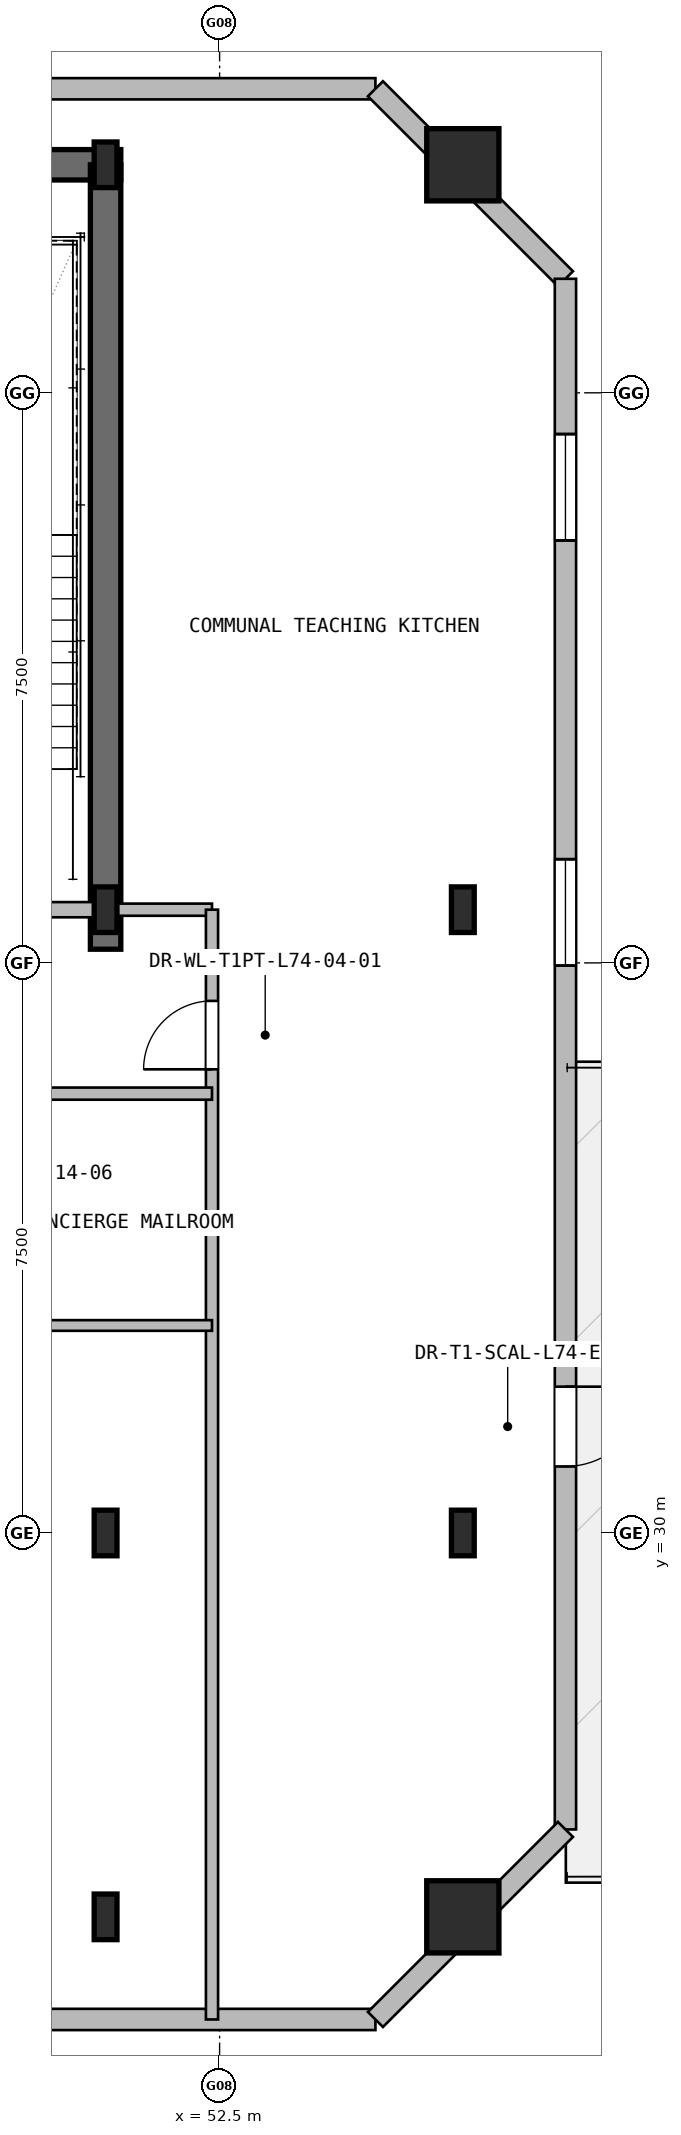
"""IFC4 building model, lengths in metres.
Left out: names, types, materials, properties, quantities, classifications, styles, units other than length and angle.
Written with IfcOpenShell. Run it as: python <this file> out.ifc"""

import sys

from ifc_helpers import new_model, si_unit, direction, frame, frame_2d, origin, origin_2d, place, context, subcontext, project, spatial, rectangle, hollow_rectangle, i_section, extrude, element, fill, save


model = new_model("IFC4")
c1 = context("Model", 3, precision=1e-05, world=origin(), true_north=direction((0.0, 1.0)))
c2 = subcontext(c1, "Body", "Model", "MODEL_VIEW")
j1 = project(units=[si_unit("LENGTHUNIT", "METRE"), si_unit("PLANEANGLEUNIT", "RADIAN")], contexts=[c1])
p1 = place(None, origin())
s1 = spatial("IfcSite", under=j1, at=p1, CompositionType="ELEMENT")
p2 = place(p1, origin())
s2 = spatial("IfcBuilding", under=s1, at=p2, CompositionType="ELEMENT")
p3 = place(p2, frame((0.0, 0.0, 265.8)))
s3 = spatial("IfcBuildingStorey", under=s2, at=p3, CompositionType="ELEMENT", Elevation=265.8)
p4 = place(p3, frame((23.8, 48.0, 0.0), z_axis=(0.0, 0.0, 1.0), x_axis=(1.0, 0.0, 0.0)))
e1 = element("IfcWall", 1, at=p4, inside=s3, PredefinedType="SHEAR", context=c2, shape_type="SweptSolid", body=[
    extrude(rectangle(XDim=27.4, YDim=0.4, at=frame_2d((13.7, 0.0))), origin(), (0.0, 0.0, 1.0), 4.2),
])
p5 = place(p3, frame((51.0, 37.68, 0.0), z_axis=(0.0, 0.0, 1.0), x_axis=(0.0, 1.0, 0.0)))
e2 = element("IfcWall", 2, at=p5, inside=s3, PredefinedType="SHEAR", context=c2, shape_type="SweptSolid", body=[
    extrude(rectangle(XDim=10.32, YDim=0.4, at=frame_2d((5.16, 0.0))), origin(), (0.0, 0.0, 1.0), 4.2),
])
for number, where, z_axis, x_axis in (
    (3, (51.0, 24.95, 0.0), (0.0, 0.0, 1.0), (1.0, 0.0, 0.0)),
    (4, (51.0, 30.0, 0.0), (0.0, 0.0, 1.0), (1.0, 0.0, 0.0)),
    (5, (51.0, 38.2, 0.0), (0.0, 0.0, 1.0), (1.0, 0.0, 0.0)),
    (6, (51.0, 48.0, 0.0), (0.0, 0.0, 1.0), (1.0, 0.0, 0.0)),
):
    element("IfcColumn", number, at=place(p3, frame(where, z_axis=z_axis, x_axis=x_axis)), inside=s3, PredefinedType="COLUMN", context=c2, shape_type="SweptSolid", body=[
        extrude(i_section(OverallWidth=0.3, OverallDepth=0.6, WebThickness=0.014, FlangeThickness=0.025, at=origin_2d()), origin(), (0.0, 0.0, 1.0), 4.2),
    ])
p6 = place(p3, frame((55.7, 24.95, 0.0), z_axis=(0.0, 0.0, 1.0), x_axis=(1.0, 0.0, 0.0)))
e7 = element("IfcColumn", 7, at=p6, inside=s3, PredefinedType="COLUMN", context=c2, shape_type="SweptSolid", body=[
    extrude(hollow_rectangle(XDim=0.95, YDim=0.95, WallThickness=0.028, at=origin_2d()), origin(), (0.0, 0.0, 1.0), 4.2),
])
for number, where, z_axis, x_axis in (
    (8, (55.7, 30.0, 0.0), (0.0, 0.0, 1.0), (1.0, 0.0, 0.0)),
    (9, (55.7, 38.2, 0.0), (0.0, 0.0, 1.0), (1.0, 0.0, 0.0)),
):
    element("IfcColumn", number, at=place(p3, frame(where, z_axis=z_axis, x_axis=x_axis)), inside=s3, PredefinedType="COLUMN", context=c2, shape_type="SweptSolid", body=[
        extrude(i_section(OverallWidth=0.3, OverallDepth=0.6, WebThickness=0.014, FlangeThickness=0.025, at=origin_2d()), origin(), (0.0, 0.0, 1.0), 4.2),
    ])
p7 = place(p3, frame((55.7, 48.0, 0.0), z_axis=(0.0, 0.0, 1.0), x_axis=(1.0, 0.0, 0.0)))
e10 = element("IfcColumn", 10, at=p7, inside=s3, PredefinedType="COLUMN", context=c2, shape_type="SweptSolid", body=[
    extrude(hollow_rectangle(XDim=0.95, YDim=0.95, WallThickness=0.028, at=origin_2d()), origin(), (0.0, 0.0, 1.0), 4.2),
])
p8 = place(p3, frame((54.55, 23.6, 0.0), z_axis=(0.0, 0.0, 1.0), x_axis=(-1.0, 0.0, 0.0)))
e11 = element("IfcWall", 11, at=p8, inside=s3, PredefinedType="SOLIDWALL", context=c2, shape_type="SweptSolid", body=[
    extrude(rectangle(XDim=34.1, YDim=0.28, at=frame_2d((17.05, 0.0))), origin(), (0.0, 0.0, 1.0), 3.93),
])
p9 = place(p8, frame((17.728, 0.0, 0.8)))
e12 = element("IfcOpeningElement", 12, at=p9, cuts=e11, PredefinedType="OPENING", context=c2, shape_type="SweptSolid", body=[
    extrude(rectangle(XDim=1.1, YDim=1.5, at=frame_2d((0.55, 0.75))), frame((0.0, 0.15, 0.0), z_axis=(0.0, -1.0, 0.0), x_axis=(1.0, 0.0, 0.0)), (0.0, 0.0, 1.0), 0.3),
])
p10 = place(p8, frame((15.279, 0.0, 0.8)))
e13 = element("IfcOpeningElement", 13, at=p10, cuts=e11, PredefinedType="OPENING", context=c2, shape_type="SweptSolid", body=[
    extrude(rectangle(XDim=1.1, YDim=1.5, at=frame_2d((0.55, 0.75))), frame((0.0, 0.15, 0.0), z_axis=(0.0, -1.0, 0.0), x_axis=(1.0, 0.0, 0.0)), (0.0, 0.0, 1.0), 0.3),
])
p11 = place(p3, frame((20.45, 49.0, 0.0), z_axis=(0.0, 0.0, 1.0), x_axis=(1.0, 0.0, 0.0)))
e14 = element("IfcWall", 14, at=p11, inside=s3, PredefinedType="SOLIDWALL", context=c2, shape_type="SweptSolid", body=[
    extrude(rectangle(XDim=34.1, YDim=0.28, at=frame_2d((17.05, 0.0))), origin(), (0.0, 0.0, 1.0), 3.93),
])
p12 = place(p3, frame((54.55, 49.0, 0.0), z_axis=(0.0, 0.0, 1.0), x_axis=(0.707106781187, -0.707106781187, 0.0)))
e15 = element("IfcWall", 15, at=p12, inside=s3, PredefinedType="SOLIDWALL", context=c2, shape_type="SweptSolid", body=[
    extrude(rectangle(XDim=3.536, YDim=0.28, at=frame_2d((1.768, 0.0))), origin(), (0.0, 0.0, 1.0), 3.93),
])
p13 = place(p3, frame((57.05, 46.5, 0.0), z_axis=(0.0, 0.0, 1.0), x_axis=(0.0, -1.0, 0.0)))
e16 = element("IfcWall", 16, at=p13, inside=s3, PredefinedType="SOLIDWALL", context=c2, shape_type="SweptSolid", body=[
    extrude(rectangle(XDim=20.4, YDim=0.28, at=frame_2d((10.2, 0.0))), origin(), (0.0, 0.0, 1.0), 3.93),
])
p14 = place(p13, frame((14.575, 0.0, 0.0)))
e17 = element("IfcOpeningElement", 17, at=p14, cuts=e16, PredefinedType="OPENING", context=c2, shape_type="SweptSolid", body=[
    extrude(rectangle(XDim=1.05, YDim=2.1, at=frame_2d((0.525, 1.05))), frame((0.0, 0.15, 0.0), z_axis=(0.0, -1.0, 0.0), x_axis=(1.0, 0.0, 0.0)), (0.0, 0.0, 1.0), 0.3),
])
p15 = place(p13, frame((2.043, 0.0, 0.8)))
e18 = element("IfcOpeningElement", 18, at=p15, cuts=e16, PredefinedType="OPENING", context=c2, shape_type="SweptSolid", body=[
    extrude(rectangle(XDim=1.4, YDim=1.65, at=frame_2d((0.7, 0.825))), frame((0.0, 0.15, 0.0), z_axis=(0.0, -1.0, 0.0), x_axis=(1.0, 0.0, 0.0)), (0.0, 0.0, 1.0), 0.3),
])
p16 = place(p13, frame((7.636, 0.0, 0.8)))
e19 = element("IfcOpeningElement", 19, at=p16, cuts=e16, PredefinedType="OPENING", context=c2, shape_type="SweptSolid", body=[
    extrude(rectangle(XDim=1.4, YDim=1.65, at=frame_2d((0.7, 0.825))), frame((0.0, 0.15, 0.0), z_axis=(0.0, -1.0, 0.0), x_axis=(1.0, 0.0, 0.0)), (0.0, 0.0, 1.0), 0.3),
])
p17 = place(p3, frame((57.05, 26.1, 0.0), z_axis=(0.0, 0.0, 1.0), x_axis=(-0.707106781187, -0.707106781187, 0.0)))
e20 = element("IfcWall", 20, at=p17, inside=s3, PredefinedType="SOLIDWALL", context=c2, shape_type="SweptSolid", body=[
    extrude(rectangle(XDim=3.536, YDim=0.28, at=frame_2d((1.768, 0.0))), origin(), (0.0, 0.0, 1.0), 3.93),
])
p18 = place(p3, frame((47.15, 38.2, 0.0), z_axis=(0.0, 0.0, 1.0), x_axis=(1.0, 0.0, 0.0)))
e21 = element("IfcWall", 21, at=p18, inside=s3, PredefinedType="PARTITIONING", context=c2, shape_type="SweptSolid", body=[
    extrude(rectangle(XDim=3.85, YDim=0.2, at=frame_2d((1.925, 0.0))), origin(), (0.0, 0.0, 1.0), 3.33),
])
p19 = place(p18, frame((0.75, 0.0, 0.0)))
e22 = element("IfcOpeningElement", 22, at=p19, cuts=e21, PredefinedType="OPENING", context=c2, shape_type="SweptSolid", body=[
    extrude(rectangle(XDim=1.12, YDim=2.1, at=frame_2d((0.56, 1.05))), frame((0.0, 0.11, 0.0), z_axis=(0.0, -1.0, 0.0), x_axis=(1.0, 0.0, 0.0)), (0.0, 0.0, 1.0), 0.22),
])
p20 = place(p3, frame((51.0, 38.2, 0.0), z_axis=(0.0, 0.0, 1.0), x_axis=(1.0, 0.0, 0.0)))
e23 = element("IfcWall", 23, at=p20, inside=s3, PredefinedType="PARTITIONING", context=c2, shape_type="SweptSolid", body=[
    extrude(rectangle(XDim=1.4, YDim=0.16, at=frame_2d((0.7, 0.0))), origin(), (0.0, 0.0, 1.0), 3.33),
])
p21 = place(p3, frame((52.4, 23.6, 0.0), z_axis=(0.0, 0.0, 1.0), x_axis=(0.0, 1.0, 0.0)))
e24 = element("IfcWall", 24, at=p21, inside=s3, PredefinedType="PARTITIONING", context=c2, shape_type="SweptSolid", body=[
    extrude(rectangle(XDim=14.6, YDim=0.16, at=frame_2d((7.3, 0.0))), origin(), (0.0, 0.0, 1.0), 3.93),
])
p22 = place(p21, frame((12.5, 0.0, 0.0)))
e25 = element("IfcOpeningElement", 25, at=p22, cuts=e24, PredefinedType="OPENING", context=c2, shape_type="SweptSolid", body=[
    extrude(rectangle(XDim=0.9, YDim=2.05, at=frame_2d((0.45, 1.025))), frame((0.0, 0.09, 0.0), z_axis=(0.0, -1.0, 0.0), x_axis=(1.0, 0.0, 0.0)), (0.0, 0.0, 1.0), 0.18),
])
p23 = place(p3, frame((46.73, 32.73, 0.0), z_axis=(0.0, 0.0, 1.0), x_axis=(1.0, 0.0, 0.0)))
e26 = element("IfcWall", 26, at=p23, inside=s3, PredefinedType="PARTITIONING", context=c2, shape_type="SweptSolid", body=[
    extrude(rectangle(XDim=5.67, YDim=0.14, at=frame_2d((2.835, 0.0))), origin(), (0.0, 0.0, 1.0), 3.93),
])
p24 = place(p3, frame((22.6, 35.78, 0.0), z_axis=(0.0, 0.0, 1.0), x_axis=(1.0, 0.0, 0.0)))
e27 = element("IfcWall", 27, at=p24, inside=s3, PredefinedType="PARTITIONING", context=c2, shape_type="SweptSolid", body=[
    extrude(rectangle(XDim=29.8, YDim=0.16, at=frame_2d((14.9, 0.0))), origin(), (0.0, 0.0, 1.0), 3.93),
])
p25 = place(p24, frame((0.8, 0.0, 0.0)))
e28 = element("IfcOpeningElement", 28, at=p25, cuts=e27, PredefinedType="OPENING", context=c2, shape_type="SweptSolid", body=[
    extrude(rectangle(XDim=0.85, YDim=2.05, at=frame_2d((0.425, 1.025))), frame((0.0, 0.09, 0.0), z_axis=(0.0, -1.0, 0.0), x_axis=(1.0, 0.0, 0.0)), (0.0, 0.0, 1.0), 0.18),
])
p26 = place(p24, frame((4.351, 0.0, 0.0)))
e29 = element("IfcOpeningElement", 29, at=p26, cuts=e27, PredefinedType="OPENING", context=c2, shape_type="SweptSolid", body=[
    extrude(rectangle(XDim=0.9, YDim=2.05, at=frame_2d((0.45, 1.025))), frame((0.0, 0.09, 0.0), z_axis=(0.0, -1.0, 0.0), x_axis=(1.0, 0.0, 0.0)), (0.0, 0.0, 1.0), 0.18),
])
p27 = place(p24, frame((9.562, 0.0, 0.0)))
e30 = element("IfcOpeningElement", 30, at=p27, cuts=e27, PredefinedType="OPENING", context=c2, shape_type="SweptSolid", body=[
    extrude(rectangle(XDim=0.85, YDim=2.05, at=frame_2d((0.425, 1.025))), frame((0.0, 0.09, 0.0), z_axis=(0.0, -1.0, 0.0), x_axis=(1.0, 0.0, 0.0)), (0.0, 0.0, 1.0), 0.18),
])
p28 = place(p24, frame((13.262, 0.0, 0.0)))
e31 = element("IfcOpeningElement", 31, at=p28, cuts=e27, PredefinedType="OPENING", context=c2, shape_type="SweptSolid", body=[
    extrude(rectangle(XDim=0.9, YDim=2.05, at=frame_2d((0.45, 1.025))), frame((0.0, 0.09, 0.0), z_axis=(0.0, -1.0, 0.0), x_axis=(1.0, 0.0, 0.0)), (0.0, 0.0, 1.0), 0.18),
])
p29 = place(p24, frame((18.001, 0.0, 0.0)))
e32 = element("IfcOpeningElement", 32, at=p29, cuts=e27, PredefinedType="OPENING", context=c2, shape_type="SweptSolid", body=[
    extrude(rectangle(XDim=0.95, YDim=2.1, at=frame_2d((0.475, 1.05))), frame((0.0, 0.09, 0.0), z_axis=(0.0, -1.0, 0.0), x_axis=(1.0, 0.0, 0.0)), (0.0, 0.0, 1.0), 0.18),
])
p30 = place(p24, frame((26.54, 0.0, 0.0)))
e33 = element("IfcOpeningElement", 33, at=p30, cuts=e27, PredefinedType="OPENING", context=c2, shape_type="SweptSolid", body=[
    extrude(rectangle(XDim=0.85, YDim=2.05, at=frame_2d((0.425, 1.025))), frame((0.0, 0.09, 0.0), z_axis=(0.0, -1.0, 0.0), x_axis=(1.0, 0.0, 0.0)), (0.0, 0.0, 1.0), 0.18),
])
p31 = place(p24, frame((22.79, 0.0, 0.0)))
e34 = element("IfcOpeningElement", 34, at=p31, cuts=e27, PredefinedType="OPENING", context=c2, shape_type="SweptSolid", body=[
    extrude(rectangle(XDim=0.9, YDim=2.05, at=frame_2d((0.45, 1.025))), frame((0.0, 0.09, 0.0), z_axis=(0.0, -1.0, 0.0), x_axis=(1.0, 0.0, 0.0)), (0.0, 0.0, 1.0), 0.18),
])
p32 = place(p14, origin())
e35 = element("IfcDoor", 35, at=p32, inside=s3, OperationType="SINGLE_SWING_RIGHT", PredefinedType="DOOR", context=c2, shape_type="SweptSolid", body=[
    extrude(rectangle(XDim=1.05, YDim=2.1, at=frame_2d((0.525, 1.05))), frame((0.0, 0.025, 0.0), z_axis=(0.0, -1.0, 0.0), x_axis=(1.0, 0.0, 0.0)), (0.0, 0.0, 1.0), 0.05),
])
fill(e17, e35)
p33 = place(p15, origin())
e36 = element("IfcWindow", 36, at=p33, inside=s3, PartitioningType="SINGLE_PANEL", PredefinedType="WINDOW", context=c2, shape_type="SweptSolid", body=[
    extrude(rectangle(XDim=1.4, YDim=1.65, at=frame_2d((0.7, 0.825))), frame((0.0, 0.03, 0.0), z_axis=(0.0, -1.0, 0.0), x_axis=(1.0, 0.0, 0.0)), (0.0, 0.0, 1.0), 0.06),
])
fill(e18, e36)
p34 = place(p16, origin())
e37 = element("IfcWindow", 37, at=p34, inside=s3, PartitioningType="SINGLE_PANEL", PredefinedType="WINDOW", context=c2, shape_type="SweptSolid", body=[
    extrude(rectangle(XDim=1.4, YDim=1.65, at=frame_2d((0.7, 0.825))), frame((0.0, 0.03, 0.0), z_axis=(0.0, -1.0, 0.0), x_axis=(1.0, 0.0, 0.0)), (0.0, 0.0, 1.0), 0.06),
])
fill(e19, e37)
p35 = place(p22, origin())
e38 = element("IfcDoor", 38, at=p35, inside=s3, OperationType="SINGLE_SWING_LEFT", PredefinedType="DOOR", context=c2, shape_type="SweptSolid", body=[
    extrude(rectangle(XDim=0.9, YDim=2.05, at=frame_2d((0.45, 1.025))), frame((0.0, 0.025, 0.0), z_axis=(0.0, -1.0, 0.0), x_axis=(1.0, 0.0, 0.0)), (0.0, 0.0, 1.0), 0.05),
])
fill(e25, e38)
save(model, sys.argv[1])
